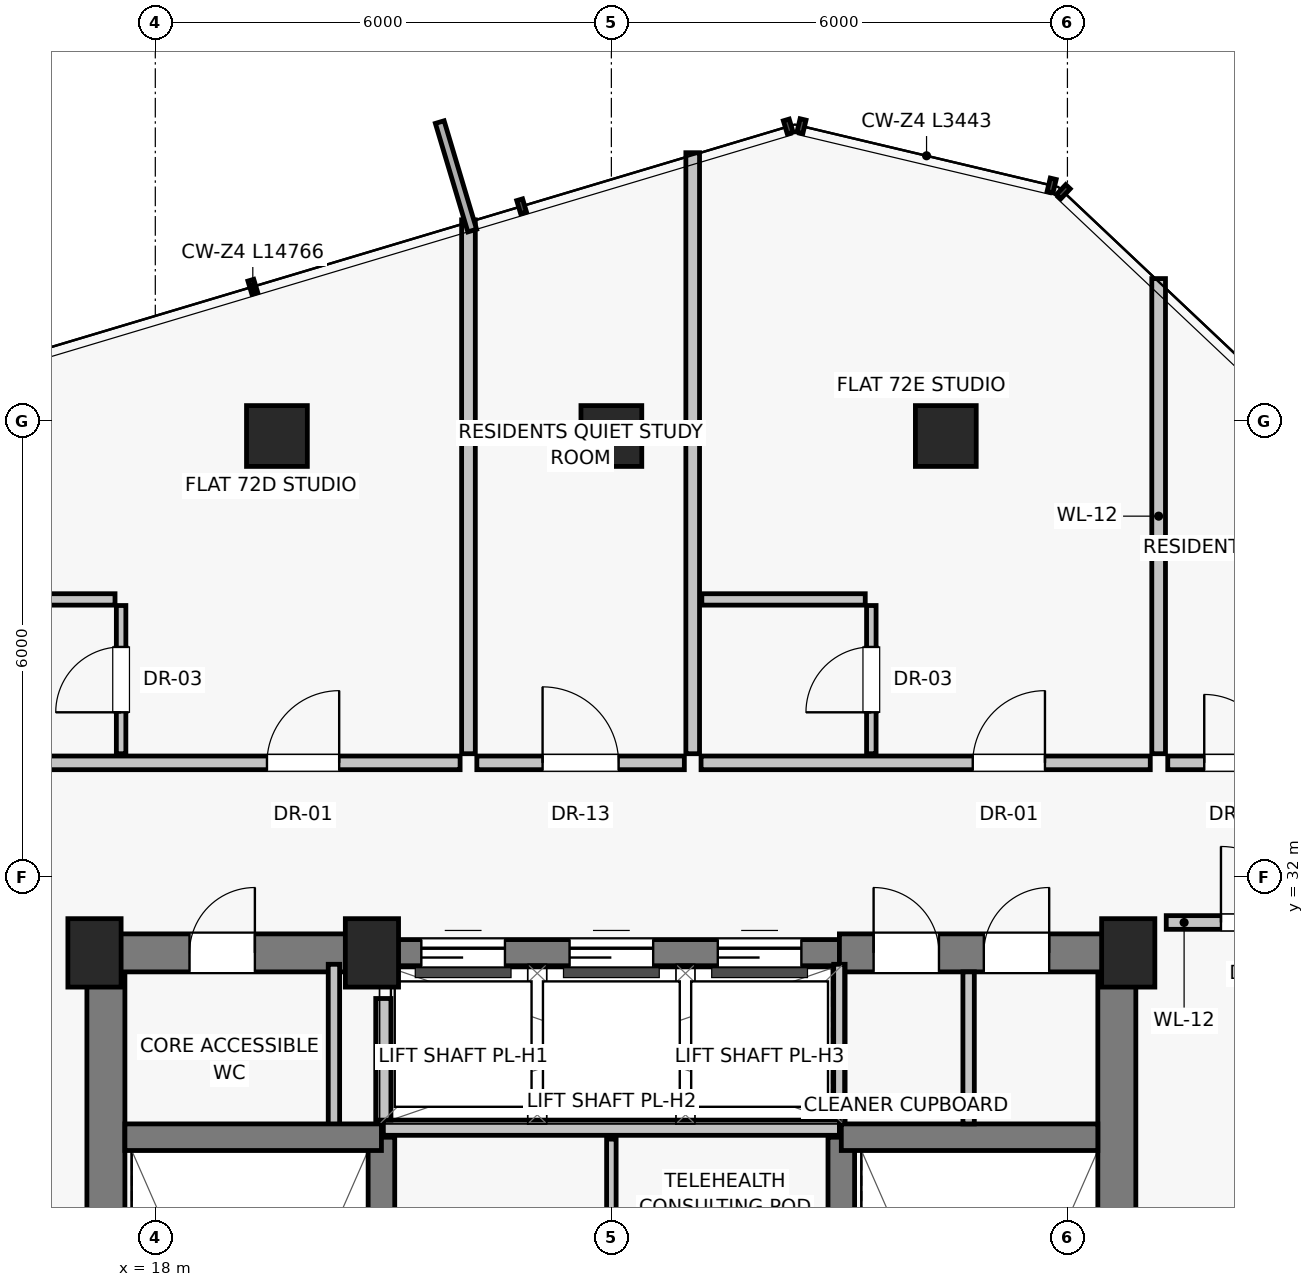
"""IFC4 building model, lengths in metres.
Left out: names, types, materials, properties, quantities, classifications, styles, units other than length and angle.
Written with IfcOpenShell. Run it as: python <this file> out.ifc"""

import sys

from ifc_helpers import new_model, si_unit, direction, frame, frame_2d, origin, origin_2d, place, context, subcontext, project, spatial, rectangle, extrude, source, transform, mapped, element, fill, save


model = new_model("IFC4")
c1 = context("Model", 3, precision=1e-05, world=origin(), true_north=direction((0.0, 1.0)))
c2 = subcontext(c1, "Body", "Model", "MODEL_VIEW")
j1 = project(units=[si_unit("LENGTHUNIT", "METRE"), si_unit("PLANEANGLEUNIT", "RADIAN")], contexts=[c1])
p1 = place(None, origin())
s1 = spatial("IfcSite", under=j1, at=p1, CompositionType="ELEMENT")
p2 = place(p1, origin())
s2 = spatial("IfcBuilding", under=s1, at=p2, CompositionType="ELEMENT")
p3 = place(p2, frame((0.0, 0.0, 254.5)))
s3 = spatial("IfcBuildingStorey", under=s2, at=p3, CompositionType="ELEMENT", Elevation=254.5)
for number, where, z_axis, x_axis in (
    (1, (17.2, 31.0, 0.0), (0.0, 0.0, 1.0), (1.0, 0.0, 0.0)),
    (2, (20.85, 31.0, 0.0), (0.0, 0.0, 1.0), (1.0, 0.0, 0.0)),
    (3, (30.8, 31.0, 0.0), (0.0, 0.0, 1.0), (1.0, 0.0, 0.0)),
):
    element("IfcColumn", number, at=place(p3, frame(where, z_axis=z_axis, x_axis=x_axis)), inside=s3, PredefinedType="PILASTER", context=c2, shape_type="SweptSolid", body=[
        extrude(rectangle(XDim=0.7, YDim=0.9, at=origin_2d()), origin(), (0.0, 0.0, 1.0), 3.25),
    ])
for number, where, z_axis, x_axis in (
    (4, (28.4, 37.8, 0.0), (0.0, 0.0, 1.0), (1.0, 0.0, 0.0)),
    (5, (24.0, 37.8, 0.0), (0.0, 0.0, 1.0), (1.0, 0.0, 0.0)),
    (6, (19.6, 37.8, 0.0), (0.0, 0.0, 1.0), (1.0, 0.0, 0.0)),
):
    element("IfcColumn", number, at=place(p3, frame(where, z_axis=z_axis, x_axis=x_axis)), inside=s3, PredefinedType="COLUMN", context=c2, shape_type="SweptSolid", body=[
        extrude(rectangle(XDim=0.8, YDim=0.8, at=origin_2d()), origin(), (0.0, 0.0, 1.0), 3.25),
    ])
for number, where, z_axis, x_axis in (
    (7, (17.35, 16.8, 0.0), (0.0, 0.0, 1.0), (0.0, 1.0, 0.0)),
    (8, (30.65, 16.8, 0.0), (0.0, 0.0, 1.0), (0.0, 1.0, 0.0)),
):
    element("IfcWall", number, at=place(p3, frame(where, z_axis=z_axis, x_axis=x_axis)), inside=s3, PredefinedType="SHEAR", context=c2, shape_type="SweptSolid", body=[
        extrude(rectangle(XDim=14.2, YDim=0.5, at=frame_2d((7.1, 0.0))), origin(), (0.0, 0.0, 1.0), 3.015),
    ])
p4 = place(p3, frame((17.2, 31.0, 0.0), z_axis=(0.0, 0.0, 1.0), x_axis=(1.0, 0.0, 0.0)))
e9 = element("IfcWall", 9, at=p4, inside=s3, PredefinedType="SHEAR", context=c2, shape_type="SweptSolid", body=[
    extrude(rectangle(XDim=3.8, YDim=0.5, at=frame_2d((1.9, 0.0))), origin(), (0.0, 0.0, 1.0), 3.015),
])
p5 = place(p4, frame((1.25, 0.0, 0.0)))
e10 = element("IfcOpeningElement", 10, at=p5, cuts=e9, PredefinedType="OPENING", context=c2, shape_type="SweptSolid", body=[
    extrude(rectangle(XDim=0.86, YDim=2.01, at=frame_2d((0.43, 1.005))), frame((0.0, 0.26, 0.0), z_axis=(0.0, -1.0, 0.0), x_axis=(1.0, 0.0, 0.0)), (0.0, 0.0, 1.0), 0.52),
])
p6 = place(p3, frame((21.0, 31.0, 0.0), z_axis=(0.0, 0.0, 1.0), x_axis=(1.0, 0.0, 0.0)))
e11 = element("IfcWall", 11, at=p6, inside=s3, PredefinedType="SHEAR", context=c2, shape_type="SweptSolid", body=[
    extrude(rectangle(XDim=6.0, YDim=0.35, at=frame_2d((3.0, 0.0))), origin(), (0.0, 0.0, 1.0), 3.015),
])
p7 = place(p6, frame((0.5, 0.0, 0.0)))
e12 = element("IfcOpeningElement", 12, at=p7, cuts=e11, PredefinedType="OPENING", context=c2, shape_type="SweptSolid", body=[
    extrude(rectangle(XDim=1.1, YDim=2.08, at=frame_2d((0.55, 1.04))), frame((0.0, 0.185, 0.0), z_axis=(0.0, -1.0, 0.0), x_axis=(1.0, 0.0, 0.0)), (0.0, 0.0, 1.0), 0.37),
])
p8 = place(p6, frame((2.45, 0.0, 0.0)))
e13 = element("IfcOpeningElement", 13, at=p8, cuts=e11, PredefinedType="OPENING", context=c2, shape_type="SweptSolid", body=[
    extrude(rectangle(XDim=1.1, YDim=2.08, at=frame_2d((0.55, 1.04))), frame((0.0, 0.185, 0.0), z_axis=(0.0, -1.0, 0.0), x_axis=(1.0, 0.0, 0.0)), (0.0, 0.0, 1.0), 0.37),
])
p9 = place(p6, frame((4.4, 0.0, 0.0)))
e14 = element("IfcOpeningElement", 14, at=p9, cuts=e11, PredefinedType="OPENING", context=c2, shape_type="SweptSolid", body=[
    extrude(rectangle(XDim=1.1, YDim=2.08, at=frame_2d((0.55, 1.04))), frame((0.0, 0.185, 0.0), z_axis=(0.0, -1.0, 0.0), x_axis=(1.0, 0.0, 0.0)), (0.0, 0.0, 1.0), 0.37),
])
p10 = place(p3, frame((27.0, 31.0, 0.0), z_axis=(0.0, 0.0, 1.0), x_axis=(1.0, 0.0, 0.0)))
e15 = element("IfcWall", 15, at=p10, inside=s3, PredefinedType="SHEAR", context=c2, shape_type="SweptSolid", body=[
    extrude(rectangle(XDim=3.8, YDim=0.5, at=frame_2d((1.9, 0.0))), origin(), (0.0, 0.0, 1.0), 3.015),
])
p11 = place(p10, frame((0.45, 0.0, 0.0)))
e16 = element("IfcOpeningElement", 16, at=p11, cuts=e15, PredefinedType="OPENING", context=c2, shape_type="SweptSolid", body=[
    extrude(rectangle(XDim=0.86, YDim=2.01, at=frame_2d((0.43, 1.005))), frame((0.0, 0.26, 0.0), z_axis=(0.0, -1.0, 0.0), x_axis=(1.0, 0.0, 0.0)), (0.0, 0.0, 1.0), 0.52),
])
p12 = place(p10, frame((1.9, 0.0, 0.0)))
e17 = element("IfcOpeningElement", 17, at=p12, cuts=e15, PredefinedType="OPENING", context=c2, shape_type="SweptSolid", body=[
    extrude(rectangle(XDim=0.86, YDim=2.01, at=frame_2d((0.43, 1.005))), frame((0.0, 0.26, 0.0), z_axis=(0.0, -1.0, 0.0), x_axis=(1.0, 0.0, 0.0)), (0.0, 0.0, 1.0), 0.52),
])
for number, where, z_axis, x_axis in (
    (18, (20.35, 28.65, 0.0), (0.0, 0.0, 1.0), (0.0, 1.0, 0.0)),
    (19, (27.0, 28.65, 0.0), (0.0, 0.0, 1.0), (0.0, 1.0, 0.0)),
):
    element("IfcWall", number, at=place(p3, frame(where, z_axis=z_axis, x_axis=x_axis)), inside=s3, PredefinedType="PARTITIONING", context=c2, shape_type="SweptSolid", body=[
        extrude(rectangle(XDim=2.2, YDim=0.15, at=frame_2d((1.1, 0.0))), origin(), (0.0, 0.0, 1.0), 3.015),
    ])
for number, where, z_axis, x_axis in (
    (20, (20.975, 19.8, 0.0), (0.0, 0.0, 1.0), (0.0, 1.0, 0.0)),
    (21, (27.025, 19.8, 0.0), (0.0, 0.0, 1.0), (0.0, 1.0, 0.0)),
):
    element("IfcWall", number, at=place(p3, frame(where, z_axis=z_axis, x_axis=x_axis)), inside=s3, PredefinedType="SHEAR", context=c2, shape_type="SweptSolid", body=[
        extrude(rectangle(XDim=8.775, YDim=0.35, at=frame_2d((4.387, 0.0))), origin(), (0.0, 0.0, 1.0), 3.015),
    ])
for number, where, z_axis, x_axis in (
    (22, (17.6, 28.575, 0.0), (0.0, 0.0, 1.0), (1.0, 0.0, 0.0)),
    (23, (27.025, 28.575, 0.0), (0.0, 0.0, 1.0), (1.0, 0.0, 0.0)),
):
    element("IfcWall", number, at=place(p3, frame(where, z_axis=z_axis, x_axis=x_axis)), inside=s3, PredefinedType="SHEAR", context=c2, shape_type="SweptSolid", body=[
        extrude(rectangle(XDim=3.375, YDim=0.35, at=frame_2d((1.688, 0.0))), origin(), (0.0, 0.0, 1.0), 3.015),
    ])
p13 = place(p3, frame((21.0, 28.7, 0.0), z_axis=(0.0, 0.0, 1.0), x_axis=(1.0, 0.0, 0.0)))
e24 = element("IfcWall", 24, at=p13, inside=s3, PredefinedType="SOLIDWALL", context=c2, shape_type="SweptSolid", body=[
    extrude(rectangle(XDim=6.0, YDim=0.2, at=frame_2d((3.0, 0.0))), origin(), (0.0, 0.0, 1.0), 3.015),
])
p14 = place(p3, frame((21.0, 28.8, 0.0), z_axis=(0.0, 0.0, 1.0), x_axis=(0.0, 1.0, 0.0)))
e25 = element("IfcWall", 25, at=p14, inside=s3, PredefinedType="SOLIDWALL", context=c2, shape_type="SweptSolid", body=[
    extrude(rectangle(XDim=1.6, YDim=0.2, at=frame_2d((0.8, 0.0))), origin(), (0.0, 0.0, 1.0), 3.015),
])
p15 = place(p3, frame((24.0, 24.2, 0.0), z_axis=(0.0, 0.0, 1.0), x_axis=(0.0, 1.0, 0.0)))
e26 = element("IfcWall", 26, at=p15, inside=s3, PredefinedType="PARTITIONING", context=c2, shape_type="SweptSolid", body=[
    extrude(rectangle(XDim=4.35, YDim=0.125, at=frame_2d((2.175, 0.0))), origin(), (0.0, 0.0, 1.0), 3.015),
])
p16 = place(p15, frame((1.6, 0.0, 0.0)))
e27 = element("IfcOpeningElement", 27, at=p16, cuts=e26, PredefinedType="OPENING", context=c2, shape_type="SweptSolid", body=[
    extrude(rectangle(XDim=0.9, YDim=2.01, at=frame_2d((0.45, 1.005))), frame((0.0, 0.073, 0.0), z_axis=(0.0, -1.0, 0.0), x_axis=(1.0, 0.0, 0.0)), (0.0, 0.0, 1.0), 0.145),
])
p17 = place(p3, frame((28.7, 28.75, 0.0), z_axis=(0.0, 0.0, 1.0), x_axis=(0.0, 1.0, 0.0)))
e28 = element("IfcWall", 28, at=p17, inside=s3, PredefinedType="PARTITIONING", context=c2, shape_type="SweptSolid", body=[
    extrude(rectangle(XDim=2.0, YDim=0.15, at=frame_2d((1.0, 0.0))), origin(), (0.0, 0.0, 1.0), 3.015),
])
p18 = place(p3, frame((31.2, 33.62, 0.0), z_axis=(0.0, 0.0, 1.0), x_axis=(0.0, 1.0, 0.0)))
e29 = element("IfcWall", 29, at=p18, inside=s3, PredefinedType="PARTITIONING", context=c2, shape_type="SweptSolid", body=[
    extrude(rectangle(XDim=6.251, YDim=0.18, at=frame_2d((3.125, 0.0))), origin(), (0.0, 0.0, 1.0), 3.015),
])
p19 = place(p3, frame((22.23, 33.5, 0.0), z_axis=(0.0, 0.0, 1.0), x_axis=(1.0, 0.0, 0.0)))
e30 = element("IfcWall", 30, at=p19, inside=s3, PredefinedType="PARTITIONING", context=c2, shape_type="SweptSolid", body=[
    extrude(rectangle(XDim=2.73, YDim=0.18, at=frame_2d((1.365, 0.0))), origin(), (0.0, 0.0, 1.0), 3.015),
])
p20 = place(p19, frame((0.865, 0.0, 0.0)))
e31 = element("IfcOpeningElement", 31, at=p20, cuts=e30, PredefinedType="OPENING", context=c2, shape_type="SweptSolid", body=[
    extrude(rectangle(XDim=1.0, YDim=2.01, at=frame_2d((0.5, 1.005))), frame((0.0, 0.1, 0.0), z_axis=(0.0, -1.0, 0.0), x_axis=(1.0, 0.0, 0.0)), (0.0, 0.0, 1.0), 0.2),
])
p21 = place(p3, frame((22.12, 33.62, 0.0), z_axis=(0.0, 0.0, 1.0), x_axis=(0.0, 1.0, 0.0)))
e32 = element("IfcWall", 32, at=p21, inside=s3, PredefinedType="PARTITIONING", context=c2, shape_type="SweptSolid", body=[
    extrude(rectangle(XDim=7.024, YDim=0.18, at=frame_2d((3.512, 0.0))), origin(), (0.0, 0.0, 1.0), 3.015),
])
p22 = place(p3, frame((15.31, 33.5, 0.0), z_axis=(0.0, 0.0, 1.0), x_axis=(1.0, 0.0, 0.0)))
e33 = element("IfcWall", 33, at=p22, inside=s3, PredefinedType="PARTITIONING", context=c2, shape_type="SweptSolid", body=[
    extrude(rectangle(XDim=6.7, YDim=0.18, at=frame_2d((3.35, 0.0))), origin(), (0.0, 0.0, 1.0), 3.015),
])
p23 = place(p22, frame((4.159, 0.0, 0.0)))
e34 = element("IfcOpeningElement", 34, at=p23, cuts=e33, PredefinedType="OPENING", context=c2, shape_type="SweptSolid", body=[
    extrude(rectangle(XDim=0.95, YDim=2.02, at=frame_2d((0.475, 1.01))), frame((0.0, 0.1, 0.0), z_axis=(0.0, -1.0, 0.0), x_axis=(1.0, 0.0, 0.0)), (0.0, 0.0, 1.0), 0.2),
])
p24 = place(p3, frame((17.55, 33.62, 0.0), z_axis=(0.0, 0.0, 1.0), x_axis=(0.0, 1.0, 0.0)))
e35 = element("IfcWall", 35, at=p24, inside=s3, PredefinedType="PARTITIONING", context=c2, shape_type="SweptSolid", body=[
    extrude(rectangle(XDim=1.95, YDim=0.125, at=frame_2d((0.975, 0.0))), origin(), (0.0, 0.0, 1.0), 3.015),
])
p25 = place(p24, frame((0.545, 0.0, 0.0)))
e36 = element("IfcOpeningElement", 36, at=p25, cuts=e35, PredefinedType="OPENING", context=c2, shape_type="SweptSolid", body=[
    extrude(rectangle(XDim=0.86, YDim=2.01, at=frame_2d((0.43, 1.005))), frame((0.0, 0.073, 0.0), z_axis=(0.0, -1.0, 0.0), x_axis=(1.0, 0.0, 0.0)), (0.0, 0.0, 1.0), 0.145),
])
p26 = place(p3, frame((15.32, 35.65, 0.0), z_axis=(0.0, 0.0, 1.0), x_axis=(1.0, 0.0, 0.0)))
e37 = element("IfcWall", 37, at=p26, inside=s3, PredefinedType="PARTITIONING", context=c2, shape_type="SweptSolid", body=[
    extrude(rectangle(XDim=2.15, YDim=0.15, at=frame_2d((1.075, 0.0))), origin(), (0.0, 0.0, 1.0), 3.015),
])
p27 = place(p3, frame((25.07, 33.62, 0.0), z_axis=(0.0, 0.0, 1.0), x_axis=(0.0, 1.0, 0.0)))
e38 = element("IfcWall", 38, at=p27, inside=s3, PredefinedType="PARTITIONING", context=c2, shape_type="SweptSolid", body=[
    extrude(rectangle(XDim=7.907, YDim=0.18, at=frame_2d((3.954, 0.0))), origin(), (0.0, 0.0, 1.0), 3.015),
])
p28 = place(p3, frame((25.18, 33.5, 0.0), z_axis=(0.0, 0.0, 1.0), x_axis=(1.0, 0.0, 0.0)))
e39 = element("IfcWall", 39, at=p28, inside=s3, PredefinedType="PARTITIONING", context=c2, shape_type="SweptSolid", body=[
    extrude(rectangle(XDim=5.91, YDim=0.18, at=frame_2d((2.955, 0.0))), origin(), (0.0, 0.0, 1.0), 3.015),
])
p29 = place(p28, frame((3.574, 0.0, 0.0)))
e40 = element("IfcOpeningElement", 40, at=p29, cuts=e39, PredefinedType="OPENING", context=c2, shape_type="SweptSolid", body=[
    extrude(rectangle(XDim=0.95, YDim=2.02, at=frame_2d((0.475, 1.01))), frame((0.0, 0.1, 0.0), z_axis=(0.0, -1.0, 0.0), x_axis=(1.0, 0.0, 0.0)), (0.0, 0.0, 1.0), 0.2),
])
p30 = place(p3, frame((27.42, 33.62, 0.0), z_axis=(0.0, 0.0, 1.0), x_axis=(0.0, 1.0, 0.0)))
e41 = element("IfcWall", 41, at=p30, inside=s3, PredefinedType="PARTITIONING", context=c2, shape_type="SweptSolid", body=[
    extrude(rectangle(XDim=1.95, YDim=0.125, at=frame_2d((0.975, 0.0))), origin(), (0.0, 0.0, 1.0), 3.015),
])
p31 = place(p30, frame((0.545, 0.0, 0.0)))
e42 = element("IfcOpeningElement", 42, at=p31, cuts=e41, PredefinedType="OPENING", context=c2, shape_type="SweptSolid", body=[
    extrude(rectangle(XDim=0.86, YDim=2.01, at=frame_2d((0.43, 1.005))), frame((0.0, 0.073, 0.0), z_axis=(0.0, -1.0, 0.0), x_axis=(1.0, 0.0, 0.0)), (0.0, 0.0, 1.0), 0.145),
])
p32 = place(p3, frame((25.19, 35.65, 0.0), z_axis=(0.0, 0.0, 1.0), x_axis=(1.0, 0.0, 0.0)))
e43 = element("IfcWall", 43, at=p32, inside=s3, PredefinedType="PARTITIONING", context=c2, shape_type="SweptSolid", body=[
    extrude(rectangle(XDim=2.15, YDim=0.15, at=frame_2d((1.075, 0.0))), origin(), (0.0, 0.0, 1.0), 3.015),
])
p33 = place(p3, frame((31.3, 31.4, 0.0), z_axis=(0.0, 0.0, 1.0), x_axis=(1.0, 0.0, 0.0)))
e44 = element("IfcWall", 44, at=p33, inside=s3, PredefinedType="PARTITIONING", context=c2, shape_type="SweptSolid", body=[
    extrude(rectangle(XDim=1.92, YDim=0.18, at=frame_2d((0.96, 0.0))), origin(), (0.0, 0.0, 1.0), 3.015),
])
p34 = place(p33, frame((0.72, 0.0, 0.0)))
e45 = element("IfcOpeningElement", 45, at=p34, cuts=e44, PredefinedType="OPENING", context=c2, shape_type="SweptSolid", body=[
    extrude(rectangle(XDim=1.0, YDim=2.01, at=frame_2d((0.5, 1.005))), frame((0.0, 0.1, 0.0), z_axis=(0.0, -1.0, 0.0), x_axis=(1.0, 0.0, 0.0)), (0.0, 0.0, 1.0), 0.2),
])
p35 = place(p3, frame((31.32, 33.5, 0.0), z_axis=(0.0, 0.0, 1.0), x_axis=(1.0, 0.0, 0.0)))
e46 = element("IfcWall", 46, at=p35, inside=s3, PredefinedType="PARTITIONING", context=c2, shape_type="SweptSolid", body=[
    extrude(rectangle(XDim=1.86, YDim=0.18, at=frame_2d((0.93, 0.0))), origin(), (0.0, 0.0, 1.0), 3.015),
])
p36 = place(p35, frame((0.48, 0.0, 0.0)))
e47 = element("IfcOpeningElement", 47, at=p36, cuts=e46, PredefinedType="OPENING", context=c2, shape_type="SweptSolid", body=[
    extrude(rectangle(XDim=0.9, YDim=2.01, at=frame_2d((0.45, 1.005))), frame((0.0, 0.1, 0.0), z_axis=(0.0, -1.0, 0.0), x_axis=(1.0, 0.0, 0.0)), (0.0, 0.0, 1.0), 0.2),
])
m1 = source(origin(), c2, "Body", "SweptSolid", [
    extrude(rectangle(XDim=0.86, YDim=2.01, at=frame_2d((0.43, 1.005))), frame((0.0, 0.025, 0.0), z_axis=(0.0, -1.0, 0.0), x_axis=(1.0, 0.0, 0.0)), (0.0, 0.0, 1.0), 0.05),
])
p37 = place(p5, origin())
e48 = element("IfcDoor", 48, at=p37, inside=s3, OperationType="SINGLE_SWING_RIGHT", PredefinedType="DOOR", context=c2, shape_type="MappedRepresentation", body=[
    mapped(m1, transform((0.0, 0.0, 0.0), scale=1.0)),
])
fill(e10, e48)
m2 = source(origin(), c2, "Body", "SweptSolid", [
    extrude(rectangle(XDim=1.1, YDim=2.08, at=frame_2d((0.55, 1.04))), frame((0.0, 0.025, 0.0), z_axis=(0.0, -1.0, 0.0), x_axis=(1.0, 0.0, 0.0)), (0.0, 0.0, 1.0), 0.05),
])
p38 = place(p7, origin())
e49 = element("IfcDoor", 49, at=p38, inside=s3, OperationType="SLIDING_TO_LEFT", PredefinedType="DOOR", context=c2, shape_type="MappedRepresentation", body=[
    mapped(m2, transform((0.0, 0.0, 0.0), scale=1.0)),
])
fill(e12, e49)
p39 = place(p8, origin())
e50 = element("IfcDoor", 50, at=p39, inside=s3, OperationType="SLIDING_TO_LEFT", PredefinedType="DOOR", context=c2, shape_type="MappedRepresentation", body=[
    mapped(m2, transform((0.0, 0.0, 0.0), scale=1.0)),
])
fill(e13, e50)
p40 = place(p9, origin())
e51 = element("IfcDoor", 51, at=p40, inside=s3, OperationType="SLIDING_TO_LEFT", PredefinedType="DOOR", context=c2, shape_type="MappedRepresentation", body=[
    mapped(m2, transform((0.0, 0.0, 0.0), scale=1.0)),
])
fill(e14, e51)
p41 = place(p11, origin())
e52 = element("IfcDoor", 52, at=p41, inside=s3, OperationType="SINGLE_SWING_LEFT", PredefinedType="DOOR", context=c2, shape_type="MappedRepresentation", body=[
    mapped(m1, transform((0.0, 0.0, 0.0), scale=1.0)),
])
fill(e16, e52)
p42 = place(p12, origin())
e53 = element("IfcDoor", 53, at=p42, inside=s3, OperationType="SINGLE_SWING_RIGHT", PredefinedType="DOOR", context=c2, shape_type="MappedRepresentation", body=[
    mapped(m1, transform((0.0, 0.0, 0.0), scale=1.0)),
])
fill(e17, e53)
m3 = source(origin(), c2, "Body", "SweptSolid", [
    extrude(rectangle(XDim=1.0, YDim=2.01, at=frame_2d((0.5, 1.005))), frame((0.0, 0.025, 0.0), z_axis=(0.0, -1.0, 0.0), x_axis=(1.0, 0.0, 0.0)), (0.0, 0.0, 1.0), 0.05),
])
p43 = place(p20, origin())
e54 = element("IfcDoor", 54, at=p43, inside=s3, OperationType="SINGLE_SWING_LEFT", PredefinedType="DOOR", context=c2, shape_type="MappedRepresentation", body=[
    mapped(m3, transform((0.0, 0.0, 0.0), scale=1.0)),
])
fill(e31, e54)
m4 = source(origin(), c2, "Body", "SweptSolid", [
    extrude(rectangle(XDim=0.95, YDim=2.02, at=frame_2d((0.475, 1.01))), frame((0.0, 0.025, 0.0), z_axis=(0.0, -1.0, 0.0), x_axis=(1.0, 0.0, 0.0)), (0.0, 0.0, 1.0), 0.05),
])
p44 = place(p23, origin())
e55 = element("IfcDoor", 55, at=p44, inside=s3, OperationType="SINGLE_SWING_RIGHT", PredefinedType="DOOR", context=c2, shape_type="MappedRepresentation", body=[
    mapped(m4, transform((0.0, 0.0, 0.0), scale=1.0)),
])
fill(e34, e55)
p45 = place(p25, origin())
e56 = element("IfcDoor", 56, at=p45, inside=s3, OperationType="SINGLE_SWING_LEFT", PredefinedType="DOOR", context=c2, shape_type="MappedRepresentation", body=[
    mapped(m1, transform((0.0, 0.0, 0.0), scale=1.0)),
])
fill(e36, e56)
p46 = place(p29, origin())
e57 = element("IfcDoor", 57, at=p46, inside=s3, OperationType="SINGLE_SWING_RIGHT", PredefinedType="DOOR", context=c2, shape_type="MappedRepresentation", body=[
    mapped(m4, transform((0.0, 0.0, 0.0), scale=1.0)),
])
fill(e40, e57)
p47 = place(p31, origin())
e58 = element("IfcDoor", 58, at=p47, inside=s3, OperationType="SINGLE_SWING_LEFT", PredefinedType="DOOR", context=c2, shape_type="MappedRepresentation", body=[
    mapped(m1, transform((0.0, 0.0, 0.0), scale=1.0)),
])
fill(e42, e58)
p48 = place(p34, origin())
e59 = element("IfcDoor", 59, at=p48, inside=s3, OperationType="SINGLE_SWING_LEFT", PredefinedType="DOOR", context=c2, shape_type="MappedRepresentation", body=[
    mapped(m3, transform((0.0, 0.0, 0.0), scale=1.0)),
])
fill(e45, e59)
m5 = source(origin(), c2, "Body", "SweptSolid", [
    extrude(rectangle(XDim=0.9, YDim=2.01, at=frame_2d((0.45, 1.005))), frame((0.0, 0.025, 0.0), z_axis=(0.0, -1.0, 0.0), x_axis=(1.0, 0.0, 0.0)), (0.0, 0.0, 1.0), 0.05),
])
p49 = place(p36, origin())
e60 = element("IfcDoor", 60, at=p49, inside=s3, OperationType="SINGLE_SWING_LEFT", PredefinedType="DOOR", context=c2, shape_type="MappedRepresentation", body=[
    mapped(m5, transform((0.0, 0.0, 0.0), scale=1.0)),
])
fill(e47, e60)
save(model, sys.argv[1])
